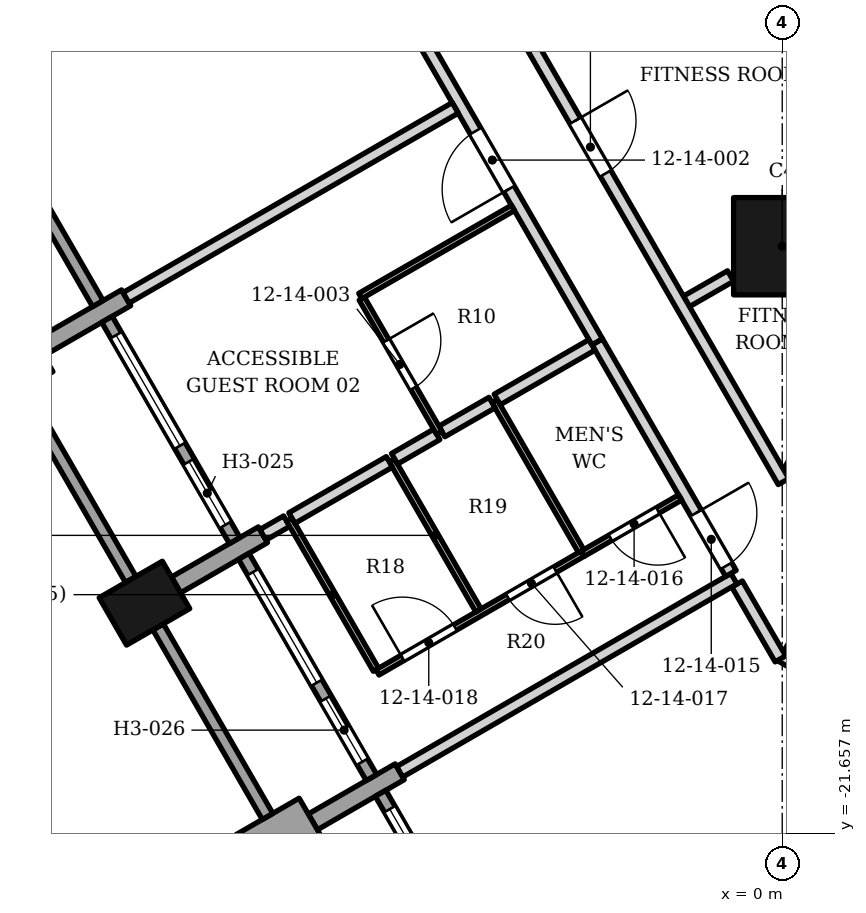
"""IFC4 building model, lengths in metres.
Left out: names, types, materials, properties, quantities, classifications, styles, units other than length and angle.
Written with IfcOpenShell. Run it as: python <this file> out.ifc"""

import sys

from ifc_helpers import new_model, si_unit, direction, frame, frame_2d, origin, origin_2d, place, context, subcontext, project, spatial, rectangle, extrude, element, fill, save


model = new_model("IFC4")
c1 = context("Model", 3, precision=1e-05, world=origin(), true_north=direction((0.0, 1.0)))
c2 = subcontext(c1, "Body", "Model", "MODEL_VIEW")
j1 = project(units=[si_unit("LENGTHUNIT", "METRE"), si_unit("PLANEANGLEUNIT", "RADIAN")], contexts=[c1])
p1 = place(None, origin())
s1 = spatial("IfcSite", under=j1, at=p1, CompositionType="ELEMENT")
p2 = place(p1, origin())
s2 = spatial("IfcBuilding", under=s1, at=p2, CompositionType="ELEMENT")
p3 = place(p2, frame((0.0, 0.0, 66.4)))
s3 = spatial("IfcBuildingStorey", under=s2, at=p3, CompositionType="ELEMENT", Elevation=66.4)
p4 = place(p3, frame((0.0, -12.0, 0.0), z_axis=(0.0, 0.0, 1.0), x_axis=(1.0, 0.0, 0.0)))
e1 = element("IfcColumn", 1, at=p4, inside=s3, PredefinedType="COLUMN", context=c2, shape_type="SweptSolid", body=[
    extrude(rectangle(XDim=1.6, YDim=1.6, at=origin_2d()), origin(), (0.0, 0.0, 1.0), 3.4),
])
p5 = place(p3, frame((-10.489, -17.87, 0.0), z_axis=(0.0, 0.0, 1.0), x_axis=(0.5, -0.866025403784, 0.0)))
e2 = element("IfcColumn", 2, at=p5, inside=s3, PredefinedType="COLUMN", context=c2, shape_type="SweptSolid", body=[
    extrude(rectangle(XDim=0.9, YDim=1.2, at=origin_2d()), origin(), (0.0, 0.0, 1.0), 3.4),
])
p6 = place(p3, frame((-13.259, -14.273, 0.0), z_axis=(0.0, 0.0, 1.0), x_axis=(0.866006032174, 0.500033551112, 0.0)))
e3 = element("IfcWall", 3, at=p6, inside=s3, PredefinedType="SOLIDWALL", context=c2, shape_type="SweptSolid", body=[
    extrude(rectangle(XDim=1.2, YDim=0.9, at=frame_2d((0.6, 0.0))), origin(), (0.0, 0.0, 1.0), 2.63),
])
p7 = place(p3, frame((-12.22, -13.673, 0.0), z_axis=(0.0, 0.0, 1.0), x_axis=(0.866040211805, 0.499974350878, 0.0)))
e4 = element("IfcWall", 4, at=p7, inside=s3, PredefinedType="SOLIDWALL", context=c2, shape_type="SweptSolid", body=[
    extrude(rectangle(XDim=1.65, YDim=0.3, at=frame_2d((0.825, 0.0))), origin(), (0.0, 0.0, 1.0), 2.65),
])
p8 = place(p3, frame((-8.541, -16.745, 0.0), z_axis=(0.0, 0.0, 1.0), x_axis=(-0.866067297121, -0.499927431592, 0.0)))
e5 = element("IfcWall", 5, at=p8, inside=s3, PredefinedType="SOLIDWALL", context=c2, shape_type="SweptSolid", body=[
    extrude(rectangle(XDim=1.65, YDim=0.3, at=frame_2d((0.825, 0.0))), origin(), (0.0, 0.0, 1.0), 2.65),
])
p9 = place(p3, frame((-8.759, -22.067, 0.0), z_axis=(0.0, 0.0, 1.0), x_axis=(0.866094119867, 0.499880961361, 0.0)))
e6 = element("IfcWall", 6, at=p9, inside=s3, PredefinedType="SOLIDWALL", context=c2, shape_type="SweptSolid", body=[
    extrude(rectangle(XDim=1.2, YDim=0.9, at=frame_2d((0.6, 0.0))), origin(), (0.0, 0.0, 1.0), 2.63),
])
p10 = place(p3, frame((-7.72, -21.467, 0.0), z_axis=(0.0, 0.0, 1.0), x_axis=(0.865976140824, 0.500085316245, 0.0)))
e7 = element("IfcWall", 7, at=p10, inside=s3, PredefinedType="SOLIDWALL", context=c2, shape_type="SweptSolid", body=[
    extrude(rectangle(XDim=1.65, YDim=0.3, at=frame_2d((0.825, 0.0))), origin(), (0.0, 0.0, 1.0), 2.65),
])
p11 = place(p3, frame((-13.355, -9.306, 0.0), z_axis=(0.0, 0.0, 1.0), x_axis=(0.499958946799, -0.866049104564, 0.0)))
e8 = element("IfcWall", 8, at=p11, inside=s3, PredefinedType="ELEMENTEDWALL", context=c2, shape_type="SweptSolid", body=[
    extrude(rectangle(XDim=4.2, YDim=0.2, at=frame_2d((2.1, 0.0))), origin(), (0.0, 0.0, 1.0), 2.374),
])
p12 = place(p3, frame((-12.514, -14.363, 0.0), z_axis=(0.0, 0.0, 1.0), x_axis=(0.499982693035, -0.866035395735, 0.0)))
e9 = element("IfcWall", 9, at=p12, inside=s3, PredefinedType="SOLIDWALL", context=c2, shape_type="SweptSolid", body=[
    extrude(rectangle(XDim=3.6, YDim=0.2, at=frame_2d((1.8, 0.0))), origin(), (0.0, 0.0, 1.0), 2.63),
])
p13 = place(p3, frame((-11.105, -13.203, 0.0), z_axis=(0.0, 0.0, 1.0), x_axis=(0.49998411664, -0.866034573852, 0.0)))
e10 = element("IfcWall", 10, at=p13, inside=s3, PredefinedType="ELEMENTEDWALL", context=c2, shape_type="SweptSolid", body=[
    extrude(rectangle(XDim=4.2, YDim=0.2, at=frame_2d((2.1, 0.0))), origin(), (0.0, 0.0, 1.0), 2.65),
])
p14 = place(p13, frame((0.3, 0.0, 0.6)))
e11 = element("IfcOpeningElement", 11, at=p14, cuts=e10, PredefinedType="OPENING", context=c2, shape_type="SweptSolid", body=[
    extrude(rectangle(XDim=2.1, YDim=1.8, at=frame_2d((1.05, 0.9))), frame((0.0, 0.11, 0.0), z_axis=(0.0, -1.0, 0.0), x_axis=(1.0, 0.0, 0.0)), (0.0, 0.0, 1.0), 0.22),
])
p15 = place(p13, frame((2.7, 0.0, 0.0)))
e12 = element("IfcOpeningElement", 12, at=p15, cuts=e10, PredefinedType="OPENING", context=c2, shape_type="SweptSolid", body=[
    extrude(rectangle(XDim=1.2, YDim=2.4, at=frame_2d((0.6, 1.2))), frame((0.0, 0.11, 0.0), z_axis=(0.0, -1.0, 0.0), x_axis=(1.0, 0.0, 0.0)), (0.0, 0.0, 1.0), 0.22),
])
p16 = place(p3, frame((-10.264, -18.26, 0.0), z_axis=(0.0, 0.0, 1.0), x_axis=(0.500012057535, -0.866018442252, 0.0)))
e13 = element("IfcWall", 13, at=p16, inside=s3, PredefinedType="SOLIDWALL", context=c2, shape_type="SweptSolid", body=[
    extrude(rectangle(XDim=3.6, YDim=0.2, at=frame_2d((1.8, 0.0))), origin(), (0.0, 0.0, 1.0), 2.63),
])
p17 = place(p3, frame((-8.855, -17.1, 0.0), z_axis=(0.0, 0.0, 1.0), x_axis=(0.49998411664, -0.866034573852, 0.0)))
e14 = element("IfcWall", 14, at=p17, inside=s3, PredefinedType="ELEMENTEDWALL", context=c2, shape_type="SweptSolid", body=[
    extrude(rectangle(XDim=4.2, YDim=0.2, at=frame_2d((2.1, 0.0))), origin(), (0.0, 0.0, 1.0), 2.65),
])
p18 = place(p17, frame((0.3, 0.0, 0.6)))
e15 = element("IfcOpeningElement", 15, at=p18, cuts=e14, PredefinedType="OPENING", context=c2, shape_type="SweptSolid", body=[
    extrude(rectangle(XDim=2.1, YDim=1.8, at=frame_2d((1.05, 0.9))), frame((0.0, 0.11, 0.0), z_axis=(0.0, -1.0, 0.0), x_axis=(1.0, 0.0, 0.0)), (0.0, 0.0, 1.0), 0.22),
])
p19 = place(p17, frame((2.7, 0.0, 0.0)))
e16 = element("IfcOpeningElement", 16, at=p19, cuts=e14, PredefinedType="OPENING", context=c2, shape_type="SweptSolid", body=[
    extrude(rectangle(XDim=1.2, YDim=2.4, at=frame_2d((0.6, 1.2))), frame((0.0, 0.11, 0.0), z_axis=(0.0, -1.0, 0.0), x_axis=(1.0, 0.0, 0.0)), (0.0, 0.0, 1.0), 0.22),
])
p20 = place(p3, frame((-6.605, -20.997, 0.0), z_axis=(0.0, 0.0, 1.0), x_axis=(0.49998411664, -0.866034573852, 0.0)))
e17 = element("IfcWall", 17, at=p20, inside=s3, PredefinedType="ELEMENTEDWALL", context=c2, shape_type="SweptSolid", body=[
    extrude(rectangle(XDim=4.2, YDim=0.2, at=frame_2d((2.1, 0.0))), origin(), (0.0, 0.0, 1.0), 2.552),
])
p21 = place(p20, frame((0.3, 0.0, 0.6)))
e18 = element("IfcOpeningElement", 18, at=p21, cuts=e17, PredefinedType="OPENING", context=c2, shape_type="SweptSolid", body=[
    extrude(rectangle(XDim=2.1, YDim=1.8, at=frame_2d((1.05, 0.9))), frame((0.0, 0.11, 0.0), z_axis=(0.0, -1.0, 0.0), x_axis=(1.0, 0.0, 0.0)), (0.0, 0.0, 1.0), 0.22),
])
p22 = place(p20, frame((2.7, 0.0, 0.0)))
e19 = element("IfcOpeningElement", 19, at=p22, cuts=e17, PredefinedType="OPENING", context=c2, shape_type="SweptSolid", body=[
    extrude(rectangle(XDim=1.2, YDim=2.4, at=frame_2d((0.6, 1.2))), frame((0.0, 0.11, 0.0), z_axis=(0.0, -1.0, 0.0), x_axis=(1.0, 0.0, 0.0)), (0.0, 0.0, 1.0), 0.22),
])
p23 = place(p3, frame((-6.657, -19.008, 0.0), z_axis=(0.0, 0.0, 1.0), x_axis=(0.865563469975, 0.50079924066, 0.0)))
e20 = element("IfcWall", 20, at=p23, inside=s3, PredefinedType="PARTITIONING", context=c2, shape_type="SweptSolid", body=[
    extrude(rectangle(XDim=3.898, YDim=0.1, at=frame_2d((1.949, 0.0))), origin(), (0.0, 0.0, 1.0), 2.552),
])
p24 = place(p23, frame((2.475, 0.0, 0.0)))
e21 = element("IfcOpeningElement", 21, at=p24, cuts=e20, PredefinedType="OPENING", context=c2, shape_type="SweptSolid", body=[
    extrude(rectangle(XDim=0.9, YDim=2.1, at=frame_2d((0.45, 1.05))), frame((0.0, 0.06, 0.0), z_axis=(0.0, -1.0, 0.0), x_axis=(1.0, 0.0, 0.0)), (0.0, 0.0, 1.0), 0.12),
])
p25 = place(p23, frame((0.475, 0.0, 0.0)))
e22 = element("IfcOpeningElement", 22, at=p25, cuts=e20, PredefinedType="OPENING", context=c2, shape_type="SweptSolid", body=[
    extrude(rectangle(XDim=1.0, YDim=2.1, at=frame_2d((0.5, 1.05))), frame((0.0, 0.06, 0.0), z_axis=(0.0, -1.0, 0.0), x_axis=(1.0, 0.0, 0.0)), (0.0, 0.0, 1.0), 0.12),
])
p26 = place(p3, frame((0.02, -18.872, 0.0), z_axis=(0.0, 0.0, 1.0), x_axis=(0.500389767685, 0.865800254329, 0.0)))
e23 = element("IfcWall", 23, at=p26, inside=s3, PredefinedType="PARTITIONING", context=c2, shape_type="SweptSolid", body=[
    extrude(rectangle(XDim=5.33, YDim=0.2, at=frame_2d((2.665, 0.0))), origin(), (0.0, 0.0, 1.0), 2.628),
])
p27 = place(p26, frame((3.931, 0.0, 0.0)))
e24 = element("IfcOpeningElement", 24, at=p27, cuts=e23, PredefinedType="OPENING", context=c2, shape_type="SweptSolid", body=[
    extrude(rectangle(XDim=1.1, YDim=2.1, at=frame_2d((0.55, 1.05))), frame((0.0, 0.11, 0.0), z_axis=(0.0, -1.0, 0.0), x_axis=(1.0, 0.0, 0.0)), (0.0, 0.0, 1.0), 0.22),
])
p28 = place(p26, frame((1.715, 0.0, 0.0)))
e25 = element("IfcOpeningElement", 25, at=p28, cuts=e23, PredefinedType="OPENING", context=c2, shape_type="SweptSolid", body=[
    extrude(rectangle(XDim=1.1, YDim=2.1, at=frame_2d((0.55, 1.05))), frame((0.0, 0.11, 0.0), z_axis=(0.0, -1.0, 0.0), x_axis=(1.0, 0.0, 0.0)), (0.0, 0.0, 1.0), 0.22),
])
p29 = place(p3, frame((-6.421, -15.521, 0.0), z_axis=(0.0, 0.0, 1.0), x_axis=(0.499972122318, -0.866041498374, 0.0)))
e26 = element("IfcWall", 26, at=p29, inside=s3, PredefinedType="PARTITIONING", context=c2, shape_type="SweptSolid", body=[
    extrude(rectangle(XDim=2.85, YDim=0.1, at=frame_2d((1.425, 0.0))), origin(), (0.0, 0.0, 1.0), 3.23),
])
p30 = place(p3, frame((-0.743, -17.555, 0.0), z_axis=(0.0, 0.0, 1.0), x_axis=(0.501049807784, -0.865418447989, 0.0)))
e27 = element("IfcWall", 27, at=p30, inside=s3, PredefinedType="PARTITIONING", context=c2, shape_type="SweptSolid", body=[
    extrude(rectangle(XDim=1.422, YDim=0.2, at=frame_2d((0.711, 0.0))), origin(), (0.0, 0.0, 1.0), 2.628),
])
p31 = place(p3, frame((-6.291, -20.642, 0.0), z_axis=(0.0, 0.0, 1.0), x_axis=(0.86590949515, 0.500200705926, 0.0)))
e28 = element("IfcWall", 28, at=p31, inside=s3, PredefinedType="PARTITIONING", context=c2, shape_type="SweptSolid", body=[
    extrude(rectangle(XDim=6.348, YDim=0.2, at=frame_2d((3.174, 0.0))), origin(), (0.0, 0.0, 1.0), 2.552),
])
p32 = place(p3, frame((-3.042, -13.573, 0.0), z_axis=(0.0, 0.0, 1.0), x_axis=(0.49998522367, -0.866033934735, 0.0)))
e29 = element("IfcWall", 29, at=p32, inside=s3, PredefinedType="PARTITIONING", context=c2, shape_type="SweptSolid", body=[
    extrude(rectangle(XDim=4.397, YDim=0.2, at=frame_2d((2.198, 0.0))), origin(), (0.0, 0.0, 1.0), 3.23),
])
p33 = place(p32, frame((3.25, 0.0, 0.0)))
e30 = element("IfcOpeningElement", 30, at=p33, cuts=e29, PredefinedType="OPENING", context=c2, shape_type="SweptSolid", body=[
    extrude(rectangle(XDim=1.0, YDim=2.1, at=frame_2d((0.5, 1.05))), frame((0.0, 0.11, 0.0), z_axis=(0.0, -1.0, 0.0), x_axis=(1.0, 0.0, 0.0)), (0.0, 0.0, 1.0), 0.22),
])
p34 = place(p3, frame((-3.281, -17.056, 0.0), z_axis=(0.0, 0.0, 1.0), x_axis=(0.866058118026, 0.49994333299, 0.0)))
e31 = element("IfcWall", 31, at=p34, inside=s3, PredefinedType="PARTITIONING", context=c2, shape_type="SweptSolid", body=[
    extrude(rectangle(XDim=1.85, YDim=0.1, at=frame_2d((0.925, 0.0))), origin(), (0.0, 0.0, 1.0), 3.23),
])
p35 = place(p34, frame((0.525, 0.0, 0.0)))
e32 = element("IfcOpeningElement", 32, at=p35, cuts=e31, PredefinedType="OPENING", context=c2, shape_type="SweptSolid", body=[
    extrude(rectangle(XDim=0.9, YDim=2.1, at=frame_2d((0.45, 1.05))), frame((0.0, 0.06, 0.0), z_axis=(0.0, -1.0, 0.0), x_axis=(1.0, 0.0, 0.0)), (0.0, 0.0, 1.0), 0.12),
])
p36 = place(p3, frame((-4.732, -14.546, 0.0), z_axis=(0.0, 0.0, 1.0), x_axis=(0.499972122318, -0.866041498374, 0.0)))
e33 = element("IfcWall", 33, at=p36, inside=s3, PredefinedType="PARTITIONING", context=c2, shape_type="SweptSolid", body=[
    extrude(rectangle(XDim=2.85, YDim=0.1, at=frame_2d((1.425, 0.0))), origin(), (0.0, 0.0, 1.0), 2.552),
])
p37 = place(p3, frame((-8.541, -16.745, 0.0), z_axis=(0.0, 0.0, 1.0), x_axis=(0.867942353255, 0.496664948861, 0.0)))
e34 = element("IfcWall", 34, at=p37, inside=s3, PredefinedType="PARTITIONING", context=c2, shape_type="SweptSolid", body=[
    extrude(rectangle(XDim=0.45, YDim=0.2, at=frame_2d((0.225, 0.0))), origin(), (0.0, 0.0, 1.0), 3.23),
])
p38 = place(p3, frame((-8.108, -16.495, 0.0), z_axis=(0.0, 0.0, 1.0), x_axis=(0.499969479948, -0.866043023828, 0.0)))
e35 = element("IfcWall", 35, at=p38, inside=s3, PredefinedType="PARTITIONING", context=c2, shape_type="SweptSolid", body=[
    extrude(rectangle(XDim=2.852, YDim=0.1, at=frame_2d((1.426, 0.0))), origin(), (0.0, 0.0, 1.0), 3.23),
])
p39 = place(p3, frame((0.069, -15.785, 0.0), z_axis=(0.0, 0.0, 1.0), x_axis=(0.499998459685, 0.866026293084, 0.0)))
e36 = element("IfcWall", 36, at=p39, inside=s3, PredefinedType="PARTITIONING", context=c2, shape_type="SweptSolid", body=[
    extrude(rectangle(XDim=9.239, YDim=0.2, at=frame_2d((4.62, 0.0))), origin(), (0.0, 0.0, 1.0), 2.302),
])
p40 = place(p39, frame((3.663, 0.0, 0.0)))
e37 = element("IfcOpeningElement", 37, at=p40, cuts=e36, PredefinedType="OPENING", context=c2, shape_type="SweptSolid", body=[
    extrude(rectangle(XDim=1.0, YDim=2.1, at=frame_2d((0.5, 1.05))), frame((0.0, 0.11, 0.0), z_axis=(0.0, -1.0, 0.0), x_axis=(1.0, 0.0, 0.0)), (0.0, 0.0, 1.0), 0.22),
])
p41 = place(p3, frame((-8.064, -16.47, 0.0), z_axis=(0.0, 0.0, 1.0), x_axis=(0.866499636502, 0.49917770377, 0.0)))
e38 = element("IfcWall", 38, at=p41, inside=s3, PredefinedType="PARTITIONING", context=c2, shape_type="SweptSolid", body=[
    extrude(rectangle(XDim=1.85, YDim=0.2, at=frame_2d((0.925, 0.0))), origin(), (0.0, 0.0, 1.0), 3.23),
])
p42 = place(p3, frame((-6.376, -15.495, 0.0), z_axis=(0.0, 0.0, 1.0), x_axis=(0.866155162719, 0.499775183552, 0.0)))
e39 = element("IfcWall", 39, at=p42, inside=s3, PredefinedType="PARTITIONING", context=c2, shape_type="SweptSolid", body=[
    extrude(rectangle(XDim=0.802, YDim=0.2, at=frame_2d((0.401, 0.0))), origin(), (0.0, 0.0, 1.0), 3.23),
])
p43 = place(p3, frame((-5.598, -15.046, 0.0), z_axis=(0.0, 0.0, 1.0), x_axis=(0.866787114338, 0.498678351664, 0.0)))
e40 = element("IfcWall", 40, at=p43, inside=s3, PredefinedType="PARTITIONING", context=c2, shape_type="SweptSolid", body=[
    extrude(rectangle(XDim=0.952, YDim=0.2, at=frame_2d((0.476, 0.0))), origin(), (0.0, 0.0, 1.0), 3.23),
])
p44 = place(p3, frame((-4.687, -14.52, 0.0), z_axis=(0.0, 0.0, 1.0), x_axis=(0.866533485277, 0.499118942632, 0.0)))
e41 = element("IfcWall", 41, at=p44, inside=s3, PredefinedType="PARTITIONING", context=c2, shape_type="SweptSolid", body=[
    extrude(rectangle(XDim=1.798, YDim=0.2, at=frame_2d((0.899, 0.0))), origin(), (0.0, 0.0, 1.0), 2.552),
])
p45 = place(p3, frame((-12.043, 2.017, 0.0), z_axis=(0.0, 0.0, 1.0), x_axis=(0.5000018851, -0.866024315419, 0.0)))
e42 = element("IfcWall", 42, at=p45, inside=s3, PredefinedType="PARTITIONING", context=c2, shape_type="SweptSolid", body=[
    extrude(rectangle(XDim=18.0, YDim=0.2, at=frame_2d((9.0, 0.0))), origin(), (0.0, 0.0, 1.0), 2.374),
])
p46 = place(p45, frame((5.95, 0.0, 0.0)))
e43 = element("IfcOpeningElement", 43, at=p46, cuts=e42, PredefinedType="OPENING", context=c2, shape_type="SweptSolid", body=[
    extrude(rectangle(XDim=1.6, YDim=2.1, at=frame_2d((0.8, 1.05))), frame((0.0, 0.11, 0.0), z_axis=(0.0, -1.0, 0.0), x_axis=(1.0, 0.0, 0.0)), (0.0, 0.0, 1.0), 0.22),
])
p47 = place(p45, frame((14.0, 0.0, 0.0)))
e44 = element("IfcOpeningElement", 44, at=p47, cuts=e42, PredefinedType="OPENING", context=c2, shape_type="SweptSolid", body=[
    extrude(rectangle(XDim=1.1, YDim=2.1, at=frame_2d((0.55, 1.05))), frame((0.0, 0.11, 0.0), z_axis=(0.0, -1.0, 0.0), x_axis=(1.0, 0.0, 0.0)), (0.0, 0.0, 1.0), 0.22),
])
p48 = place(p3, frame((-1.576, -12.908, 0.0), z_axis=(0.0, 0.0, 1.0), x_axis=(0.866912601189, 0.498460170825, 0.0)))
e45 = element("IfcWall", 45, at=p48, inside=s3, PredefinedType="PARTITIONING", context=c2, shape_type="SweptSolid", body=[
    extrude(rectangle(XDim=0.838, YDim=0.2, at=frame_2d((0.419, 0.0))), origin(), (0.0, 0.0, 1.0), 3.23),
])
p49 = place(p3, frame((-6.915, -12.862, 0.0), z_axis=(0.0, 0.0, 1.0), x_axis=(0.500062241894, -0.865989465428, 0.0)))
e46 = element("IfcWall", 46, at=p49, inside=s3, PredefinedType="PARTITIONING", context=c2, shape_type="SweptSolid", body=[
    extrude(rectangle(XDim=2.55, YDim=0.1, at=frame_2d((1.275, 0.0))), origin(), (0.0, 0.0, 1.0), 3.23),
])
p50 = place(p49, frame((0.8, 0.0, 0.0)))
e47 = element("IfcOpeningElement", 47, at=p50, cuts=e46, PredefinedType="OPENING", context=c2, shape_type="SweptSolid", body=[
    extrude(rectangle(XDim=0.9, YDim=2.1, at=frame_2d((0.45, 1.05))), frame((0.0, 0.06, 0.0), z_axis=(0.0, -1.0, 0.0), x_axis=(1.0, 0.0, 0.0)), (0.0, 0.0, 1.0), 0.12),
])
p51 = place(p3, frame((-6.94, -12.818, 0.0), z_axis=(0.0, 0.0, 1.0), x_axis=(0.866314505181, 0.49949892704, 0.0)))
e48 = element("IfcWall", 48, at=p51, inside=s3, PredefinedType="PARTITIONING", context=c2, shape_type="SweptSolid", body=[
    extrude(rectangle(XDim=2.9, YDim=0.1, at=frame_2d((1.45, 0.0))), origin(), (0.0, 0.0, 1.0), 2.374),
])
p52 = place(p3, frame((-10.791, -12.848, 0.0), z_axis=(0.0, 0.0, 1.0), x_axis=(0.866170627668, 0.499748380452, 0.0)))
e49 = element("IfcWall", 49, at=p52, inside=s3, PredefinedType="PARTITIONING", context=c2, shape_type="SweptSolid", body=[
    extrude(rectangle(XDim=6.25, YDim=0.2, at=frame_2d((3.125, 0.0))), origin(), (0.0, 0.0, 1.0), 2.374),
])
p53 = place(p3, frame((-4.649, -7.782, 0.0), z_axis=(0.0, 0.0, 1.0), x_axis=(0.500018878653, -0.866014503915, 0.0)))
e50 = element("IfcWall", 50, at=p53, inside=s3, PredefinedType="PARTITIONING", context=c2, shape_type="SweptSolid", body=[
    extrude(rectangle(XDim=9.34, YDim=0.2, at=frame_2d((4.67, 0.0))), origin(), (0.0, 0.0, 1.0), 2.374),
])
p54 = place(p53, frame((2.488, 0.0, 0.0)))
e51 = element("IfcOpeningElement", 51, at=p54, cuts=e50, PredefinedType="OPENING", context=c2, shape_type="SweptSolid", body=[
    extrude(rectangle(XDim=1.0, YDim=2.1, at=frame_2d((0.5, 1.05))), frame((0.0, 0.11, 0.0), z_axis=(0.0, -1.0, 0.0), x_axis=(1.0, 0.0, 0.0)), (0.0, 0.0, 1.0), 0.22),
])
p55 = place(p14, origin())
e52 = element("IfcWindow", 52, at=p55, inside=s3, PartitioningType="SINGLE_PANEL", PredefinedType="WINDOW", context=c2, shape_type="SweptSolid", body=[
    extrude(rectangle(XDim=2.1, YDim=1.8, at=frame_2d((1.05, 0.9))), frame((0.0, 0.03, 0.0), z_axis=(0.0, -1.0, 0.0), x_axis=(1.0, 0.0, 0.0)), (0.0, 0.0, 1.0), 0.06),
])
fill(e11, e52)
p56 = place(p15, origin())
e53 = element("IfcDoor", 53, at=p56, inside=s3, OperationType="SINGLE_SWING_LEFT", PredefinedType="DOOR", context=c2, shape_type="SweptSolid", body=[
    extrude(rectangle(XDim=1.2, YDim=2.4, at=frame_2d((0.6, 1.2))), frame((0.0, 0.025, 0.0), z_axis=(0.0, -1.0, 0.0), x_axis=(1.0, 0.0, 0.0)), (0.0, 0.0, 1.0), 0.05),
])
fill(e12, e53)
p57 = place(p18, origin())
e54 = element("IfcWindow", 54, at=p57, inside=s3, PartitioningType="SINGLE_PANEL", PredefinedType="WINDOW", context=c2, shape_type="SweptSolid", body=[
    extrude(rectangle(XDim=2.1, YDim=1.8, at=frame_2d((1.05, 0.9))), frame((0.0, 0.03, 0.0), z_axis=(0.0, -1.0, 0.0), x_axis=(1.0, 0.0, 0.0)), (0.0, 0.0, 1.0), 0.06),
])
fill(e15, e54)
p58 = place(p19, origin())
e55 = element("IfcDoor", 55, at=p58, inside=s3, OperationType="SINGLE_SWING_LEFT", PredefinedType="DOOR", context=c2, shape_type="SweptSolid", body=[
    extrude(rectangle(XDim=1.2, YDim=2.4, at=frame_2d((0.6, 1.2))), frame((0.0, 0.025, 0.0), z_axis=(0.0, -1.0, 0.0), x_axis=(1.0, 0.0, 0.0)), (0.0, 0.0, 1.0), 0.05),
])
fill(e16, e55)
p59 = place(p21, origin())
e56 = element("IfcWindow", 56, at=p59, inside=s3, PartitioningType="SINGLE_PANEL", PredefinedType="WINDOW", context=c2, shape_type="SweptSolid", body=[
    extrude(rectangle(XDim=2.1, YDim=1.8, at=frame_2d((1.05, 0.9))), frame((0.0, 0.03, 0.0), z_axis=(0.0, -1.0, 0.0), x_axis=(1.0, 0.0, 0.0)), (0.0, 0.0, 1.0), 0.06),
])
fill(e18, e56)
p60 = place(p47, origin())
e57 = element("IfcDoor", 57, at=p60, inside=s3, OperationType="SINGLE_SWING_RIGHT", PredefinedType="DOOR", context=c2, shape_type="SweptSolid", body=[
    extrude(rectangle(XDim=1.1, YDim=2.1, at=frame_2d((0.55, 1.05))), frame((0.0, 0.025, 0.0), z_axis=(0.0, -1.0, 0.0), x_axis=(1.0, 0.0, 0.0)), (0.0, 0.0, 1.0), 0.05),
])
fill(e44, e57)
p61 = place(p50, origin())
e58 = element("IfcDoor", 58, at=p61, inside=s3, OperationType="SINGLE_SWING_LEFT", PredefinedType="DOOR", context=c2, shape_type="SweptSolid", body=[
    extrude(rectangle(XDim=0.9, YDim=2.1, at=frame_2d((0.45, 1.05))), frame((0.0, 0.025, 0.0), z_axis=(0.0, -1.0, 0.0), x_axis=(1.0, 0.0, 0.0)), (0.0, 0.0, 1.0), 0.05),
])
fill(e47, e58)
p62 = place(p54, origin())
e59 = element("IfcDoor", 59, at=p62, inside=s3, OperationType="SINGLE_SWING_LEFT", PredefinedType="DOOR", context=c2, shape_type="SweptSolid", body=[
    extrude(rectangle(XDim=1.0, YDim=2.1, at=frame_2d((0.5, 1.05))), frame((0.0, 0.025, 0.0), z_axis=(0.0, -1.0, 0.0), x_axis=(1.0, 0.0, 0.0)), (0.0, 0.0, 1.0), 0.05),
])
fill(e51, e59)
p63 = place(p33, origin())
e60 = element("IfcDoor", 60, at=p63, inside=s3, OperationType="SINGLE_SWING_LEFT", PredefinedType="DOOR", context=c2, shape_type="SweptSolid", body=[
    extrude(rectangle(XDim=1.0, YDim=2.1, at=frame_2d((0.5, 1.05))), frame((0.0, 0.025, 0.0), z_axis=(0.0, -1.0, 0.0), x_axis=(1.0, 0.0, 0.0)), (0.0, 0.0, 1.0), 0.05),
])
fill(e30, e60)
p64 = place(p35, origin())
e61 = element("IfcDoor", 61, at=p64, inside=s3, OperationType="SINGLE_SWING_RIGHT", PredefinedType="DOOR", context=c2, shape_type="SweptSolid", body=[
    extrude(rectangle(XDim=0.9, YDim=2.1, at=frame_2d((0.45, 1.05))), frame((0.0, 0.025, 0.0), z_axis=(0.0, -1.0, 0.0), x_axis=(1.0, 0.0, 0.0)), (0.0, 0.0, 1.0), 0.05),
])
fill(e32, e61)
p65 = place(p24, origin())
e62 = element("IfcDoor", 62, at=p65, inside=s3, OperationType="SINGLE_SWING_RIGHT", PredefinedType="DOOR", context=c2, shape_type="SweptSolid", body=[
    extrude(rectangle(XDim=0.9, YDim=2.1, at=frame_2d((0.45, 1.05))), frame((0.0, 0.025, 0.0), z_axis=(0.0, -1.0, 0.0), x_axis=(1.0, 0.0, 0.0)), (0.0, 0.0, 1.0), 0.05),
])
fill(e21, e62)
p66 = place(p25, origin())
e63 = element("IfcDoor", 63, at=p66, inside=s3, OperationType="SINGLE_SWING_LEFT", PredefinedType="DOOR", context=c2, shape_type="SweptSolid", body=[
    extrude(rectangle(XDim=1.0, YDim=2.1, at=frame_2d((0.5, 1.05))), frame((0.0, 0.025, 0.0), z_axis=(0.0, -1.0, 0.0), x_axis=(1.0, 0.0, 0.0)), (0.0, 0.0, 1.0), 0.05),
])
fill(e22, e63)
save(model, sys.argv[1])
